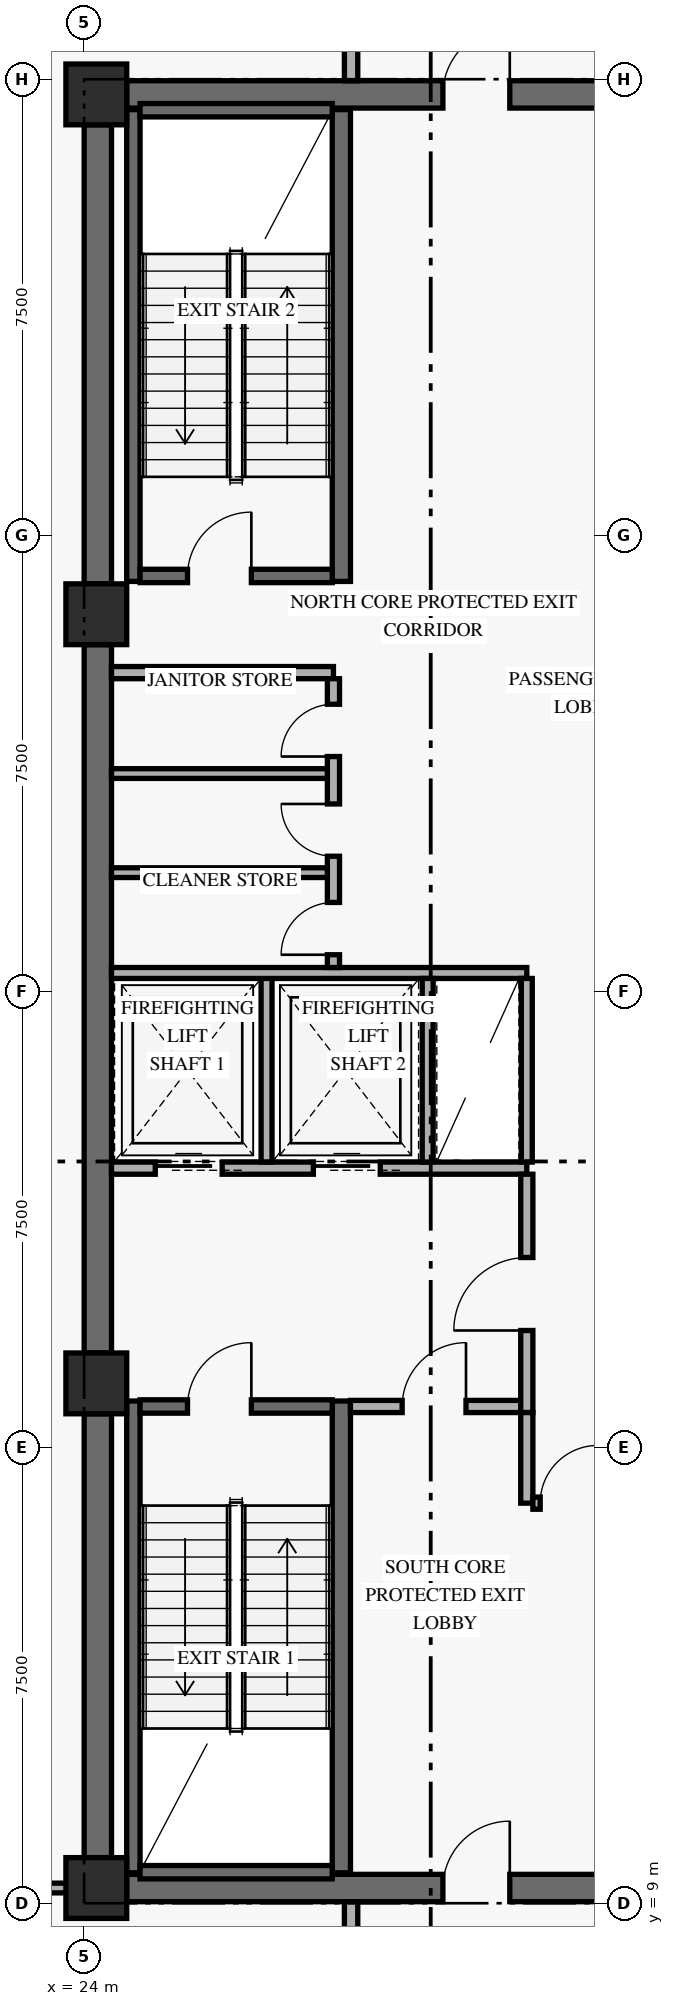
"""IFC4 building model, lengths in metres.
Left out: names, types, materials, properties, quantities, classifications, styles, units other than length and angle.
Written with IfcOpenShell. Run it as: python <this file> out.ifc"""

import sys

from ifc_helpers import new_model, si_unit, direction, frame, frame_2d, origin, origin_2d, place, context, subcontext, project, spatial, rectangle, extrude, element, fill, save


model = new_model("IFC4")
c1 = context("Model", 3, precision=1e-05, world=origin(), true_north=direction((0.0, 1.0)))
c2 = subcontext(c1, "Body", "Model", "MODEL_VIEW")
j1 = project(units=[si_unit("LENGTHUNIT", "METRE"), si_unit("PLANEANGLEUNIT", "RADIAN")], contexts=[c1])
p1 = place(None, origin())
s1 = spatial("IfcSite", under=j1, at=p1, CompositionType="ELEMENT")
p2 = place(p1, origin())
s2 = spatial("IfcBuilding", under=s1, at=p2, CompositionType="ELEMENT")
p3 = place(p2, origin())
s3 = spatial("IfcBuildingStorey", under=s2, at=p3, CompositionType="ELEMENT", Elevation=0.0)
p4 = place(p3, frame((24.225, 9.75, 0.0), z_axis=(0.0, 0.0, 1.0), x_axis=(0.0, 1.0, 0.0)))
e1 = element("IfcWall", 1, at=p4, inside=s3, PredefinedType="SHEAR", context=c2, shape_type="SweptSolid", body=[
    extrude(rectangle(XDim=7.3, YDim=0.45, at=frame_2d((3.65, 0.0))), origin(), (0.0, 0.0, 1.0), 3.539),
])
p5 = place(p3, frame((24.225, 18.05, 0.0), z_axis=(0.0, 0.0, 1.0), x_axis=(0.0, 1.0, 0.0)))
e2 = element("IfcWall", 2, at=p5, inside=s3, PredefinedType="SHEAR", context=c2, shape_type="SweptSolid", body=[
    extrude(rectangle(XDim=11.65, YDim=0.45, at=frame_2d((5.825, 0.0))), origin(), (0.0, 0.0, 1.0), 3.539),
])
p6 = place(p3, frame((24.225, 30.7, 0.0), z_axis=(0.0, 0.0, 1.0), x_axis=(0.0, 1.0, 0.0)))
e3 = element("IfcWall", 3, at=p6, inside=s3, PredefinedType="SHEAR", context=c2, shape_type="SweptSolid", body=[
    extrude(rectangle(XDim=7.55, YDim=0.45, at=frame_2d((3.775, 0.0))), origin(), (0.0, 0.0, 1.0), 3.539),
])
p7 = place(p3, frame((24.7, 9.25, 0.0), z_axis=(0.0, 0.0, 1.0), x_axis=(1.0, 0.0, 0.0)))
e4 = element("IfcWall", 4, at=p7, inside=s3, PredefinedType="SHEAR", context=c2, shape_type="SweptSolid", body=[
    extrude(rectangle(XDim=10.0, YDim=0.45, at=frame_2d((5.0, 0.0))), origin(), (0.0, 0.0, 1.0), 4.39),
])
p8 = place(p7, frame((5.2, 0.0, 0.0)))
e5 = element("IfcOpeningElement", 5, at=p8, cuts=e4, PredefinedType="OPENING", context=c2, shape_type="SweptSolid", body=[
    extrude(rectangle(XDim=1.1, YDim=2.15, at=frame_2d((0.55, 1.075))), frame((0.0, 0.235, 0.0), z_axis=(0.0, -1.0, 0.0), x_axis=(1.0, 0.0, 0.0)), (0.0, 0.0, 1.0), 0.47),
])
p9 = place(p3, frame((24.7, 38.75, 0.0), z_axis=(0.0, 0.0, 1.0), x_axis=(1.0, 0.0, 0.0)))
e6 = element("IfcWall", 6, at=p9, inside=s3, PredefinedType="SHEAR", context=c2, shape_type="SweptSolid", body=[
    extrude(rectangle(XDim=10.0, YDim=0.45, at=frame_2d((5.0, 0.0))), origin(), (0.0, 0.0, 1.0), 4.39),
])
p10 = place(p9, frame((5.2, 0.0, 0.0)))
e7 = element("IfcOpeningElement", 7, at=p10, cuts=e6, PredefinedType="OPENING", context=c2, shape_type="SweptSolid", body=[
    extrude(rectangle(XDim=1.1, YDim=2.15, at=frame_2d((0.55, 1.075))), frame((0.0, 0.235, 0.0), z_axis=(0.0, -1.0, 0.0), x_axis=(1.0, 0.0, 0.0)), (0.0, 0.0, 1.0), 0.47),
])
p11 = place(p3, frame((24.81, 9.5, 0.0), z_axis=(0.0, 0.0, 1.0), x_axis=(0.0, 1.0, 0.0)))
e8 = element("IfcWall", 8, at=p11, inside=s3, PredefinedType="SHEAR", context=c2, shape_type="SweptSolid", body=[
    extrude(rectangle(XDim=7.76, YDim=0.22, at=frame_2d((3.88, 0.0))), origin(), (0.0, 0.0, 1.0), 4.39),
])
p12 = place(p3, frame((28.23, 9.5, 0.0), z_axis=(0.0, 0.0, 1.0), x_axis=(0.0, 1.0, 0.0)))
e9 = element("IfcWall", 9, at=p12, inside=s3, PredefinedType="SHEAR", context=c2, shape_type="SweptSolid", body=[
    extrude(rectangle(XDim=7.76, YDim=0.3, at=frame_2d((3.88, 0.0))), origin(), (0.0, 0.0, 1.0), 4.39),
])
p13 = place(p3, frame((24.92, 9.51, 0.0), z_axis=(0.0, 0.0, 1.0), x_axis=(1.0, 0.0, 0.0)))
e10 = element("IfcWall", 10, at=p13, inside=s3, PredefinedType="SHEAR", context=c2, shape_type="SweptSolid", body=[
    extrude(rectangle(XDim=3.16, YDim=0.22, at=frame_2d((1.58, 0.0))), origin(), (0.0, 0.0, 1.0), 4.39),
])
p14 = place(p3, frame((24.92, 17.17, 0.0), z_axis=(0.0, 0.0, 1.0), x_axis=(1.0, 0.0, 0.0)))
e11 = element("IfcWall", 11, at=p14, inside=s3, PredefinedType="SHEAR", context=c2, shape_type="SweptSolid", body=[
    extrude(rectangle(XDim=3.16, YDim=0.22, at=frame_2d((1.58, 0.0))), origin(), (0.0, 0.0, 1.0), 4.39),
])
p15 = place(p14, frame((0.78, 0.0, 0.0)))
e12 = element("IfcOpeningElement", 12, at=p15, cuts=e11, PredefinedType="OPENING", context=c2, shape_type="SweptSolid", body=[
    extrude(rectangle(XDim=1.05, YDim=2.15, at=frame_2d((0.525, 1.075))), frame((0.0, 0.12, 0.0), z_axis=(0.0, -1.0, 0.0), x_axis=(1.0, 0.0, 0.0)), (0.0, 0.0, 1.0), 0.24),
])
p16 = place(p3, frame((24.81, 30.74, 0.0), z_axis=(0.0, 0.0, 1.0), x_axis=(0.0, 1.0, 0.0)))
e13 = element("IfcWall", 13, at=p16, inside=s3, PredefinedType="SHEAR", context=c2, shape_type="SweptSolid", body=[
    extrude(rectangle(XDim=7.76, YDim=0.22, at=frame_2d((3.88, 0.0))), origin(), (0.0, 0.0, 1.0), 4.39),
])
p17 = place(p3, frame((28.23, 30.74, 0.0), z_axis=(0.0, 0.0, 1.0), x_axis=(0.0, 1.0, 0.0)))
e14 = element("IfcWall", 14, at=p17, inside=s3, PredefinedType="SHEAR", context=c2, shape_type="SweptSolid", body=[
    extrude(rectangle(XDim=7.76, YDim=0.3, at=frame_2d((3.88, 0.0))), origin(), (0.0, 0.0, 1.0), 4.39),
])
p18 = place(p3, frame((24.92, 30.83, 0.0), z_axis=(0.0, 0.0, 1.0), x_axis=(1.0, 0.0, 0.0)))
e15 = element("IfcWall", 15, at=p18, inside=s3, PredefinedType="SHEAR", context=c2, shape_type="SweptSolid", body=[
    extrude(rectangle(XDim=3.16, YDim=0.22, at=frame_2d((1.58, 0.0))), origin(), (0.0, 0.0, 1.0), 4.39),
])
p19 = place(p18, frame((0.78, 0.0, 0.0)))
e16 = element("IfcOpeningElement", 16, at=p19, cuts=e15, PredefinedType="OPENING", context=c2, shape_type="SweptSolid", body=[
    extrude(rectangle(XDim=1.05, YDim=2.15, at=frame_2d((0.525, 1.075))), frame((0.0, 0.12, 0.0), z_axis=(0.0, -1.0, 0.0), x_axis=(1.0, 0.0, 0.0)), (0.0, 0.0, 1.0), 0.24),
])
p20 = place(p3, frame((24.92, 38.49, 0.0), z_axis=(0.0, 0.0, 1.0), x_axis=(1.0, 0.0, 0.0)))
e17 = element("IfcWall", 17, at=p20, inside=s3, PredefinedType="SHEAR", context=c2, shape_type="SweptSolid", body=[
    extrude(rectangle(XDim=3.16, YDim=0.22, at=frame_2d((1.58, 0.0))), origin(), (0.0, 0.0, 1.0), 4.39),
])
for number, where, z_axis, x_axis in (
    (18, (24.2, 9.25, 0.0), (0.0, 0.0, 1.0), (1.0, 0.0, 0.0)),
    (19, (24.2, 17.55, 0.0), (0.0, 0.0, 1.0), (1.0, 0.0, 0.0)),
    (20, (24.2, 30.2, 0.0), (0.0, 0.0, 1.0), (1.0, 0.0, 0.0)),
    (21, (24.2, 38.75, 0.0), (0.0, 0.0, 1.0), (1.0, 0.0, 0.0)),
):
    element("IfcColumn", number, at=place(p3, frame(where, z_axis=z_axis, x_axis=x_axis)), inside=s3, PredefinedType="COLUMN", context=c2, shape_type="SweptSolid", body=[
        extrude(rectangle(XDim=1.0, YDim=1.0, at=origin_2d()), origin(), (0.0, 0.0, 1.0), 4.8),
    ])
p21 = place(p3, frame((24.45, 21.09, 0.0), z_axis=(0.0, 0.0, 1.0), x_axis=(1.0, 0.0, 0.0)))
e22 = element("IfcWall", 22, at=p21, inside=s3, PredefinedType="STANDARD", context=c2, shape_type="SweptSolid", body=[
    extrude(rectangle(XDim=6.83, YDim=0.2, at=frame_2d((3.415, 0.0))), origin(), (0.0, 0.0, 1.0), 4.39),
])
p22 = place(p21, frame((0.72, 0.0, 0.0)))
e23 = element("IfcOpeningElement", 23, at=p22, cuts=e22, PredefinedType="OPENING", context=c2, shape_type="SweptSolid", body=[
    extrude(rectangle(XDim=1.1, YDim=2.2, at=frame_2d((0.55, 1.1))), frame((0.0, 0.11, 0.0), z_axis=(0.0, -1.0, 0.0), x_axis=(1.0, 0.0, 0.0)), (0.0, 0.0, 1.0), 0.22),
])
p23 = place(p21, frame((3.32, 0.0, 0.0)))
e24 = element("IfcOpeningElement", 24, at=p23, cuts=e22, PredefinedType="OPENING", context=c2, shape_type="SweptSolid", body=[
    extrude(rectangle(XDim=1.1, YDim=2.2, at=frame_2d((0.55, 1.1))), frame((0.0, 0.11, 0.0), z_axis=(0.0, -1.0, 0.0), x_axis=(1.0, 0.0, 0.0)), (0.0, 0.0, 1.0), 0.22),
])
p24 = place(p3, frame((28.38, 17.17, 0.0), z_axis=(0.0, 0.0, 1.0), x_axis=(1.0, 0.0, 0.0)))
e25 = element("IfcWall", 25, at=p24, inside=s3, PredefinedType="STANDARD", context=c2, shape_type="SweptSolid", body=[
    extrude(rectangle(XDim=2.9, YDim=0.2, at=frame_2d((1.45, 0.0))), origin(), (0.0, 0.0, 1.0), 4.39),
])
p25 = place(p24, frame((0.85, 0.0, 0.0)))
e26 = element("IfcOpeningElement", 26, at=p25, cuts=e25, PredefinedType="OPENING", context=c2, shape_type="SweptSolid", body=[
    extrude(rectangle(XDim=1.05, YDim=2.15, at=frame_2d((0.525, 1.075))), frame((0.0, 0.11, 0.0), z_axis=(0.0, -1.0, 0.0), x_axis=(1.0, 0.0, 0.0)), (0.0, 0.0, 1.0), 0.22),
])
p26 = place(p3, frame((31.28, 17.07, 0.0), z_axis=(0.0, 0.0, 1.0), x_axis=(0.0, 1.0, 0.0)))
e27 = element("IfcWall", 27, at=p26, inside=s3, PredefinedType="STANDARD", context=c2, shape_type="SweptSolid", body=[
    extrude(rectangle(XDim=3.92, YDim=0.2, at=frame_2d((1.96, 0.0))), origin(), (0.0, 0.0, 1.0), 3.272),
])
p27 = place(p26, frame((1.35, 0.0, 0.0)))
e28 = element("IfcOpeningElement", 28, at=p27, cuts=e27, PredefinedType="OPENING", context=c2, shape_type="SweptSolid", body=[
    extrude(rectangle(XDim=1.2, YDim=2.15, at=frame_2d((0.6, 1.075))), frame((0.0, 0.11, 0.0), z_axis=(0.0, -1.0, 0.0), x_axis=(1.0, 0.0, 0.0)), (0.0, 0.0, 1.0), 0.22),
])
p28 = place(p3, frame((27.0, 21.19, 0.0), z_axis=(0.0, 0.0, 1.0), x_axis=(0.0, 1.0, 0.0)))
e29 = element("IfcWall", 29, at=p28, inside=s3, PredefinedType="STANDARD", context=c2, shape_type="SweptSolid", body=[
    extrude(rectangle(XDim=3.11, YDim=0.18, at=frame_2d((1.555, 0.0))), origin(), (0.0, 0.0, 1.0), 4.39),
])
p29 = place(p3, frame((24.45, 24.3, 0.0), z_axis=(0.0, 0.0, 1.0), x_axis=(1.0, 0.0, 0.0)))
e30 = element("IfcWall", 30, at=p29, inside=s3, PredefinedType="STANDARD", context=c2, shape_type="SweptSolid", body=[
    extrude(rectangle(XDim=6.83, YDim=0.18, at=frame_2d((3.415, 0.0))), origin(), (0.0, 0.0, 1.0), 4.39),
])
for number, where, z_axis, x_axis in (
    (31, (29.65, 21.19, 0.0), (0.0, 0.0, 1.0), (0.0, 1.0, 0.0)),
    (32, (31.28, 21.19, 0.0), (0.0, 0.0, 1.0), (0.0, 1.0, 0.0)),
):
    element("IfcWall", number, at=place(p3, frame(where, z_axis=z_axis, x_axis=x_axis)), inside=s3, PredefinedType="STANDARD", context=c2, shape_type="SweptSolid", body=[
        extrude(rectangle(XDim=3.02, YDim=0.18, at=frame_2d((1.51, 0.0))), origin(), (0.0, 0.0, 1.0), 4.39),
    ])
p30 = place(p3, frame((24.45, 29.24, 0.0), z_axis=(0.0, 0.0, 1.0), x_axis=(1.0, 0.0, 0.0)))
e33 = element("IfcWall", 33, at=p30, inside=s3, PredefinedType="STANDARD", context=c2, shape_type="SweptSolid", body=[
    extrude(rectangle(XDim=3.65, YDim=0.2, at=frame_2d((1.825, 0.0))), origin(), (0.0, 0.0, 1.0), 4.39),
])
p31 = place(p3, frame((28.1, 24.39, 0.0), z_axis=(0.0, 0.0, 1.0), x_axis=(0.0, 1.0, 0.0)))
e34 = element("IfcWall", 34, at=p31, inside=s3, PredefinedType="STANDARD", context=c2, shape_type="SweptSolid", body=[
    extrude(rectangle(XDim=4.75, YDim=0.2, at=frame_2d((2.375, 0.0))), origin(), (0.0, 0.0, 1.0), 4.39),
])
p32 = place(p31, frame((0.21, 0.0, 0.0)))
e35 = element("IfcOpeningElement", 35, at=p32, cuts=e34, PredefinedType="OPENING", context=c2, shape_type="SweptSolid", body=[
    extrude(rectangle(XDim=0.86, YDim=2.1, at=frame_2d((0.43, 1.05))), frame((0.0, 0.11, 0.0), z_axis=(0.0, -1.0, 0.0), x_axis=(1.0, 0.0, 0.0)), (0.0, 0.0, 1.0), 0.22),
])
p33 = place(p31, frame((1.83, 0.0, 0.0)))
e36 = element("IfcOpeningElement", 36, at=p33, cuts=e34, PredefinedType="OPENING", context=c2, shape_type="SweptSolid", body=[
    extrude(rectangle(XDim=0.86, YDim=2.1, at=frame_2d((0.43, 1.05))), frame((0.0, 0.11, 0.0), z_axis=(0.0, -1.0, 0.0), x_axis=(1.0, 0.0, 0.0)), (0.0, 0.0, 1.0), 0.22),
])
p34 = place(p31, frame((3.47, 0.0, 0.0)))
e37 = element("IfcOpeningElement", 37, at=p34, cuts=e34, PredefinedType="OPENING", context=c2, shape_type="SweptSolid", body=[
    extrude(rectangle(XDim=0.86, YDim=2.1, at=frame_2d((0.43, 1.05))), frame((0.0, 0.11, 0.0), z_axis=(0.0, -1.0, 0.0), x_axis=(1.0, 0.0, 0.0)), (0.0, 0.0, 1.0), 0.22),
])
for number, where, z_axis, x_axis in (
    (38, (24.45, 25.95, 0.0), (0.0, 0.0, 1.0), (1.0, 0.0, 0.0)),
    (39, (24.45, 27.58, 0.0), (0.0, 0.0, 1.0), (1.0, 0.0, 0.0)),
):
    element("IfcWall", number, at=place(p3, frame(where, z_axis=z_axis, x_axis=x_axis)), inside=s3, PredefinedType="PARTITIONING", context=c2, shape_type="SweptSolid", body=[
        extrude(rectangle(XDim=3.55, YDim=0.16, at=frame_2d((1.775, 0.0))), origin(), (0.0, 0.0, 1.0), 4.39),
    ])
p35 = place(p3, frame((31.28, 15.58, 0.0), z_axis=(0.0, 0.0, 1.0), x_axis=(0.0, 1.0, 0.0)))
e40 = element("IfcWall", 40, at=p35, inside=s3, PredefinedType="STANDARD", context=c2, shape_type="SweptSolid", body=[
    extrude(rectangle(XDim=1.49, YDim=0.2, at=frame_2d((0.745, 0.0))), origin(), (0.0, 0.0, 1.0), 4.39),
])
p36 = place(p3, frame((31.38, 15.58, 0.0), z_axis=(0.0, 0.0, 1.0), x_axis=(1.0, 0.0, 0.0)))
e41 = element("IfcWall", 41, at=p36, inside=s3, PredefinedType="STANDARD", context=c2, shape_type="SweptSolid", body=[
    extrude(rectangle(XDim=1.27, YDim=0.2, at=frame_2d((0.635, 0.0))), origin(), (0.0, 0.0, 1.0), 4.39),
])
p37 = place(p36, frame((0.12, 0.0, 0.0)))
e42 = element("IfcOpeningElement", 42, at=p37, cuts=e41, PredefinedType="OPENING", context=c2, shape_type="SweptSolid", body=[
    extrude(rectangle(XDim=0.95, YDim=2.15, at=frame_2d((0.475, 1.075))), frame((0.0, 0.11, 0.0), z_axis=(0.0, -1.0, 0.0), x_axis=(1.0, 0.0, 0.0)), (0.0, 0.0, 1.0), 0.22),
])
p38 = place(p3, frame((28.39, 0.32, 0.0), z_axis=(0.0, 0.0, 1.0), x_axis=(0.0, 1.0, 0.0)))
e43 = element("IfcWall", 43, at=p38, inside=s3, PredefinedType="STANDARD", context=c2, shape_type="SweptSolid", body=[
    extrude(rectangle(XDim=8.705, YDim=0.22, at=frame_2d((4.353, 0.0))), origin(), (0.0, 0.0, 1.0), 3.761),
])
p39 = place(p3, frame((28.39, 38.975, 0.0), z_axis=(0.0, 0.0, 1.0), x_axis=(0.0, 1.0, 0.0)))
e44 = element("IfcWall", 44, at=p39, inside=s3, PredefinedType="STANDARD", context=c2, shape_type="SweptSolid", body=[
    extrude(rectangle(XDim=16.505, YDim=0.22, at=frame_2d((8.252, 0.0))), origin(), (0.0, 0.0, 1.0), 3.272),
])
p40 = place(p39, frame((3.575, 0.0, 0.0)))
e45 = element("IfcOpeningElement", 45, at=p40, cuts=e44, PredefinedType="OPENING", context=c2, shape_type="SweptSolid", body=[
    extrude(rectangle(XDim=1.05, YDim=2.15, at=frame_2d((0.525, 1.075))), frame((0.0, 0.12, 0.0), z_axis=(0.0, -1.0, 0.0), x_axis=(1.0, 0.0, 0.0)), (0.0, 0.0, 1.0), 0.24),
])
p41 = place(p3, frame((11.2, 9.25, 0.0), z_axis=(0.0, 0.0, 1.0), x_axis=(1.0, 0.0, 0.0)))
e46 = element("IfcWall", 46, at=p41, inside=s3, PredefinedType="PARTITIONING", context=c2, shape_type="SweptSolid", body=[
    extrude(rectangle(XDim=12.8, YDim=0.16, at=frame_2d((6.4, 0.0))), origin(), (0.0, 0.0, 1.0), 3.272),
])
p42 = place(p41, frame((7.77, 0.0, 0.0)))
e47 = element("IfcOpeningElement", 47, at=p42, cuts=e46, PredefinedType="OPENING", context=c2, shape_type="SweptSolid", body=[
    extrude(rectangle(XDim=1.15, YDim=2.15, at=frame_2d((0.575, 1.075))), frame((0.0, 0.09, 0.0), z_axis=(0.0, -1.0, 0.0), x_axis=(1.0, 0.0, 0.0)), (0.0, 0.0, 1.0), 0.18),
])
p43 = place(p15, frame((1.05, 0.0, 0.0), z_axis=(0.0, 0.0, 1.0), x_axis=(-1.0, 0.0, 0.0)))
e48 = element("IfcDoor", 48, at=p43, inside=s3, OperationType="SINGLE_SWING_LEFT", PredefinedType="DOOR", context=c2, shape_type="SweptSolid", body=[
    extrude(rectangle(XDim=1.05, YDim=2.15, at=frame_2d((0.525, 1.075))), frame((0.0, 0.025, 0.0), z_axis=(0.0, -1.0, 0.0), x_axis=(1.0, 0.0, 0.0)), (0.0, 0.0, 1.0), 0.05),
])
fill(e12, e48)
p44 = place(p19, origin())
e49 = element("IfcDoor", 49, at=p44, inside=s3, OperationType="SINGLE_SWING_RIGHT", PredefinedType="DOOR", context=c2, shape_type="SweptSolid", body=[
    extrude(rectangle(XDim=1.05, YDim=2.15, at=frame_2d((0.525, 1.075))), frame((0.0, 0.025, 0.0), z_axis=(0.0, -1.0, 0.0), x_axis=(1.0, 0.0, 0.0)), (0.0, 0.0, 1.0), 0.05),
])
fill(e16, e49)
p45 = place(p22, origin())
e50 = element("IfcDoor", 50, at=p45, inside=s3, OperationType="SLIDING_TO_LEFT", PredefinedType="DOOR", context=c2, shape_type="SweptSolid", body=[
    extrude(rectangle(XDim=1.1, YDim=2.2, at=frame_2d((0.55, 1.1))), frame((0.0, 0.025, 0.0), z_axis=(0.0, -1.0, 0.0), x_axis=(1.0, 0.0, 0.0)), (0.0, 0.0, 1.0), 0.05),
])
fill(e23, e50)
p46 = place(p23, origin())
e51 = element("IfcDoor", 51, at=p46, inside=s3, OperationType="SLIDING_TO_LEFT", PredefinedType="DOOR", context=c2, shape_type="SweptSolid", body=[
    extrude(rectangle(XDim=1.1, YDim=2.2, at=frame_2d((0.55, 1.1))), frame((0.0, 0.025, 0.0), z_axis=(0.0, -1.0, 0.0), x_axis=(1.0, 0.0, 0.0)), (0.0, 0.0, 1.0), 0.05),
])
fill(e24, e51)
p47 = place(p25, origin())
e52 = element("IfcDoor", 52, at=p47, inside=s3, OperationType="SINGLE_SWING_RIGHT", PredefinedType="DOOR", context=c2, shape_type="SweptSolid", body=[
    extrude(rectangle(XDim=1.05, YDim=2.15, at=frame_2d((0.525, 1.075))), frame((0.0, 0.025, 0.0), z_axis=(0.0, -1.0, 0.0), x_axis=(1.0, 0.0, 0.0)), (0.0, 0.0, 1.0), 0.05),
])
fill(e26, e52)
p48 = place(p27, origin())
e53 = element("IfcDoor", 53, at=p48, inside=s3, OperationType="SINGLE_SWING_LEFT", PredefinedType="DOOR", context=c2, shape_type="SweptSolid", body=[
    extrude(rectangle(XDim=1.2, YDim=2.15, at=frame_2d((0.6, 1.075))), frame((0.0, 0.025, 0.0), z_axis=(0.0, -1.0, 0.0), x_axis=(1.0, 0.0, 0.0)), (0.0, 0.0, 1.0), 0.05),
])
fill(e28, e53)
p49 = place(p32, origin())
e54 = element("IfcDoor", 54, at=p49, inside=s3, OperationType="SINGLE_SWING_LEFT", PredefinedType="DOOR", context=c2, shape_type="SweptSolid", body=[
    extrude(rectangle(XDim=0.86, YDim=2.1, at=frame_2d((0.43, 1.05))), frame((0.0, 0.025, 0.0), z_axis=(0.0, -1.0, 0.0), x_axis=(1.0, 0.0, 0.0)), (0.0, 0.0, 1.0), 0.05),
])
fill(e35, e54)
p50 = place(p33, origin())
e55 = element("IfcDoor", 55, at=p50, inside=s3, OperationType="SINGLE_SWING_RIGHT", PredefinedType="DOOR", context=c2, shape_type="SweptSolid", body=[
    extrude(rectangle(XDim=0.86, YDim=2.1, at=frame_2d((0.43, 1.05))), frame((0.0, 0.025, 0.0), z_axis=(0.0, -1.0, 0.0), x_axis=(1.0, 0.0, 0.0)), (0.0, 0.0, 1.0), 0.05),
])
fill(e36, e55)
p51 = place(p34, origin())
e56 = element("IfcDoor", 56, at=p51, inside=s3, OperationType="SINGLE_SWING_LEFT", PredefinedType="DOOR", context=c2, shape_type="SweptSolid", body=[
    extrude(rectangle(XDim=0.86, YDim=2.1, at=frame_2d((0.43, 1.05))), frame((0.0, 0.025, 0.0), z_axis=(0.0, -1.0, 0.0), x_axis=(1.0, 0.0, 0.0)), (0.0, 0.0, 1.0), 0.05),
])
fill(e37, e56)
p52 = place(p37, frame((0.95, 0.0, 0.0), z_axis=(0.0, 0.0, 1.0), x_axis=(-1.0, 0.0, 0.0)))
e57 = element("IfcDoor", 57, at=p52, inside=s3, OperationType="SINGLE_SWING_LEFT", PredefinedType="DOOR", context=c2, shape_type="SweptSolid", body=[
    extrude(rectangle(XDim=0.95, YDim=2.15, at=frame_2d((0.475, 1.075))), frame((0.0, 0.025, 0.0), z_axis=(0.0, -1.0, 0.0), x_axis=(1.0, 0.0, 0.0)), (0.0, 0.0, 1.0), 0.05),
])
fill(e42, e57)
p53 = place(p8, frame((1.1, 0.0, 0.0), z_axis=(0.0, 0.0, 1.0), x_axis=(-1.0, 0.0, 0.0)))
e58 = element("IfcDoor", 58, at=p53, inside=s3, OperationType="SINGLE_SWING_LEFT", PredefinedType="DOOR", context=c2, shape_type="SweptSolid", body=[
    extrude(rectangle(XDim=1.1, YDim=2.15, at=frame_2d((0.55, 1.075))), frame((0.0, 0.025, 0.0), z_axis=(0.0, -1.0, 0.0), x_axis=(1.0, 0.0, 0.0)), (0.0, 0.0, 1.0), 0.05),
])
fill(e5, e58)
p54 = place(p10, origin())
e59 = element("IfcDoor", 59, at=p54, inside=s3, OperationType="SINGLE_SWING_RIGHT", PredefinedType="DOOR", context=c2, shape_type="SweptSolid", body=[
    extrude(rectangle(XDim=1.1, YDim=2.15, at=frame_2d((0.55, 1.075))), frame((0.0, 0.025, 0.0), z_axis=(0.0, -1.0, 0.0), x_axis=(1.0, 0.0, 0.0)), (0.0, 0.0, 1.0), 0.05),
])
fill(e7, e59)
save(model, sys.argv[1])
